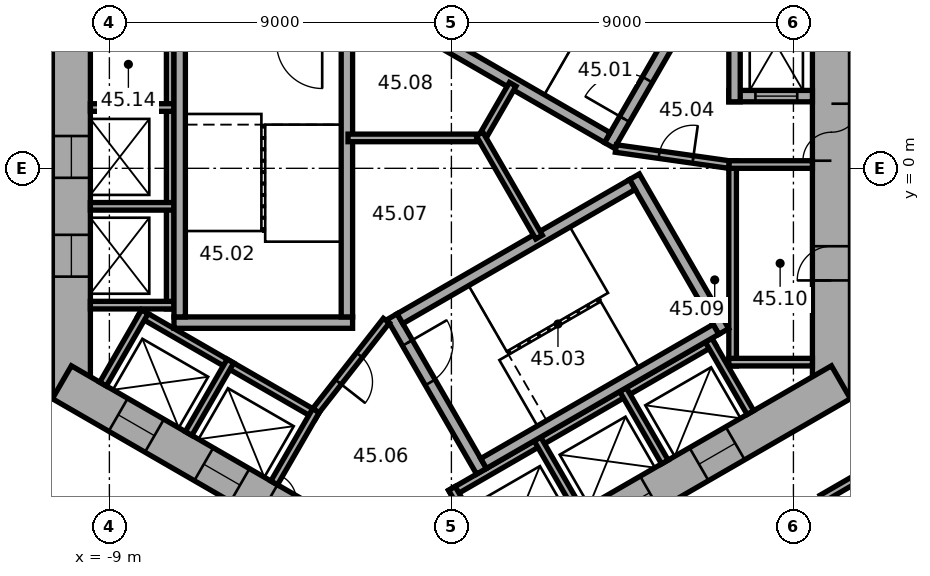
"""IFC4 building model, lengths in metres.
Left out: names, types, materials, properties, quantities, classifications, styles, units other than length and angle.
Written with IfcOpenShell. Run it as: python <this file> out.ifc"""

import sys

from ifc_helpers import new_model, si_unit, direction, frame, frame_2d, origin, place, context, subcontext, project, spatial, rectangle, extrude, element, fill, save


model = new_model("IFC4")
c1 = context("Model", 3, precision=1e-05, world=origin(), true_north=direction((0.0, 1.0)))
c2 = subcontext(c1, "Body", "Model", "MODEL_VIEW")
j1 = project(units=[si_unit("LENGTHUNIT", "METRE"), si_unit("PLANEANGLEUNIT", "RADIAN")], contexts=[c1])
p1 = place(None, origin())
s1 = spatial("IfcSite", under=j1, at=p1, CompositionType="ELEMENT")
p2 = place(p1, origin())
s2 = spatial("IfcBuilding", under=s1, at=p2, CompositionType="ELEMENT")
p3 = place(p2, frame((0.0, 0.0, 183.6)))
s3 = spatial("IfcBuildingStorey", under=s2, at=p3, CompositionType="ELEMENT", Elevation=183.6)
p4 = place(p3, frame((10.0, -6.062, 0.0), z_axis=(0.0, 0.0, 1.0), x_axis=(0.0, 1.0, 0.0)))
e1 = element("IfcWall", 1, at=p4, inside=s3, PredefinedType="SHEAR", context=c2, shape_type="SweptSolid", body=[
    extrude(rectangle(XDim=12.125, YDim=1.0, at=frame_2d((6.062, 0.0))), origin(), (0.0, 0.0, 1.0), 3.7),
])
p5 = place(p4, frame((6.262, 0.0, 0.0)))
e2 = element("IfcOpeningElement", 2, at=p5, cuts=e1, PredefinedType="OPENING", context=c2, shape_type="SweptSolid", body=[
    extrude(rectangle(XDim=1.5, YDim=2.1, at=frame_2d((0.75, 1.05))), frame((0.0, 0.51, 0.0), z_axis=(0.0, -1.0, 0.0), x_axis=(1.0, 0.0, 0.0)), (0.0, 0.0, 1.0), 1.02),
])
p6 = place(p4, frame((3.112, 0.0, 0.0)))
e3 = element("IfcOpeningElement", 3, at=p6, cuts=e1, PredefinedType="OPENING", context=c2, shape_type="SweptSolid", body=[
    extrude(rectangle(XDim=0.9, YDim=2.1, at=frame_2d((0.45, 1.05))), frame((0.0, 0.51, 0.0), z_axis=(0.0, -1.0, 0.0), x_axis=(1.0, 0.0, 0.0)), (0.0, 0.0, 1.0), 1.02),
])
p7 = place(p3, frame((-10.0, 6.062, 0.0), z_axis=(0.0, 0.0, 1.0), x_axis=(0.0, -1.0, 0.0)))
e4 = element("IfcWall", 4, at=p7, inside=s3, PredefinedType="SHEAR", context=c2, shape_type="SweptSolid", body=[
    extrude(rectangle(XDim=12.125, YDim=1.0, at=frame_2d((6.062, 0.0))), origin(), (0.0, 0.0, 1.0), 3.7),
])
p8 = place(p7, frame((5.212, 0.0, 0.0)))
e5 = element("IfcOpeningElement", 5, at=p8, cuts=e4, PredefinedType="OPENING", context=c2, shape_type="SweptSolid", body=[
    extrude(rectangle(XDim=1.1, YDim=2.1, at=frame_2d((0.55, 1.05))), frame((0.0, 0.51, 0.0), z_axis=(0.0, -1.0, 0.0), x_axis=(1.0, 0.0, 0.0)), (0.0, 0.0, 1.0), 1.02),
])
p9 = place(p7, frame((7.812, 0.0, 0.0)))
e6 = element("IfcOpeningElement", 6, at=p9, cuts=e4, PredefinedType="OPENING", context=c2, shape_type="SweptSolid", body=[
    extrude(rectangle(XDim=1.1, YDim=2.1, at=frame_2d((0.55, 1.05))), frame((0.0, 0.51, 0.0), z_axis=(0.0, -1.0, 0.0), x_axis=(1.0, 0.0, 0.0)), (0.0, 0.0, 1.0), 1.02),
])
p10 = place(p3, frame((-10.25, -5.629, 0.0), z_axis=(0.0, 0.0, 1.0), x_axis=(0.866022616891, -0.50000482701, 0.0)))
e7 = element("IfcWall", 7, at=p10, inside=s3, PredefinedType="SHEAR", context=c2, shape_type="SweptSolid", body=[
    extrude(rectangle(XDim=12.125, YDim=1.0, at=frame_2d((6.062, 0.0))), origin(), (0.0, 0.0, 1.0), 3.7),
])
p11 = place(p10, frame((6.262, 0.0, 0.0)))
e8 = element("IfcOpeningElement", 8, at=p11, cuts=e7, PredefinedType="OPENING", context=c2, shape_type="SweptSolid", body=[
    extrude(rectangle(XDim=1.5, YDim=2.1, at=frame_2d((0.75, 1.05))), frame((0.0, 0.51, 0.0), z_axis=(0.0, -1.0, 0.0), x_axis=(1.0, 0.0, 0.0)), (0.0, 0.0, 1.0), 1.02),
])
p12 = place(p10, frame((1.712, 0.0, 0.0)))
e9 = element("IfcOpeningElement", 9, at=p12, cuts=e7, PredefinedType="OPENING", context=c2, shape_type="SweptSolid", body=[
    extrude(rectangle(XDim=1.1, YDim=2.1, at=frame_2d((0.55, 1.05))), frame((0.0, 0.51, 0.0), z_axis=(0.0, -1.0, 0.0), x_axis=(1.0, 0.0, 0.0)), (0.0, 0.0, 1.0), 1.02),
])
p13 = place(p10, frame((4.312, 0.0, 0.0)))
e10 = element("IfcOpeningElement", 10, at=p13, cuts=e7, PredefinedType="OPENING", context=c2, shape_type="SweptSolid", body=[
    extrude(rectangle(XDim=1.1, YDim=2.1, at=frame_2d((0.55, 1.05))), frame((0.0, 0.51, 0.0), z_axis=(0.0, -1.0, 0.0), x_axis=(1.0, 0.0, 0.0)), (0.0, 0.0, 1.0), 1.02),
])
p14 = place(p3, frame((-0.25, -11.691, 0.0), z_axis=(0.0, 0.0, 1.0), x_axis=(0.866022616891, 0.50000482701, 0.0)))
e11 = element("IfcWall", 11, at=p14, inside=s3, PredefinedType="SHEAR", context=c2, shape_type="SweptSolid", body=[
    extrude(rectangle(XDim=12.125, YDim=1.0, at=frame_2d((6.062, 0.0))), origin(), (0.0, 0.0, 1.0), 3.7),
])
p15 = place(p14, frame((2.612, 0.0, 0.0)))
e12 = element("IfcOpeningElement", 12, at=p15, cuts=e11, PredefinedType="OPENING", context=c2, shape_type="SweptSolid", body=[
    extrude(rectangle(XDim=1.1, YDim=2.1, at=frame_2d((0.55, 1.05))), frame((0.0, 0.51, 0.0), z_axis=(0.0, -1.0, 0.0), x_axis=(1.0, 0.0, 0.0)), (0.0, 0.0, 1.0), 1.02),
])
p16 = place(p14, frame((5.212, 0.0, 0.0)))
e13 = element("IfcOpeningElement", 13, at=p16, cuts=e11, PredefinedType="OPENING", context=c2, shape_type="SweptSolid", body=[
    extrude(rectangle(XDim=1.1, YDim=2.1, at=frame_2d((0.55, 1.05))), frame((0.0, 0.51, 0.0), z_axis=(0.0, -1.0, 0.0), x_axis=(1.0, 0.0, 0.0)), (0.0, 0.0, 1.0), 1.02),
])
p17 = place(p14, frame((7.812, 0.0, 0.0)))
e14 = element("IfcOpeningElement", 14, at=p17, cuts=e11, PredefinedType="OPENING", context=c2, shape_type="SweptSolid", body=[
    extrude(rectangle(XDim=1.1, YDim=2.1, at=frame_2d((0.55, 1.05))), frame((0.0, 0.51, 0.0), z_axis=(0.0, -1.0, 0.0), x_axis=(1.0, 0.0, 0.0)), (0.0, 0.0, 1.0), 1.02),
])
p18 = place(p3, frame((7.4, -5.2, 0.0), z_axis=(0.0, 0.0, 1.0), x_axis=(0.0, 1.0, 0.0)))
e15 = element("IfcWall", 15, at=p18, inside=s3, PredefinedType="PARTITIONING", context=c2, shape_type="SweptSolid", body=[
    extrude(rectangle(XDim=5.4, YDim=0.2, at=frame_2d((2.7, 0.0))), origin(), (0.0, 0.0, 1.0), 3.42),
])
for number, where, z_axis, x_axis in (
    (16, (7.3, -5.1, 0.0), (0.0, 0.0, 1.0), (1.0, 0.0, 0.0)),
    (17, (7.3, 0.1, 0.0), (0.0, 0.0, 1.0), (1.0, 0.0, 0.0)),
):
    element("IfcWall", number, at=place(p3, frame(where, z_axis=z_axis, x_axis=x_axis)), inside=s3, PredefinedType="PARTITIONING", context=c2, shape_type="SweptSolid", body=[
        extrude(rectangle(XDim=2.2, YDim=0.2, at=frame_2d((1.1, 0.0))), origin(), (0.0, 0.0, 1.0), 3.42),
    ])
p19 = place(p3, frame((-7.4, 4.3, 0.0), z_axis=(0.0, 0.0, 1.0), x_axis=(0.0, -1.0, 0.0)))
e18 = element("IfcWall", 18, at=p19, inside=s3, PredefinedType="PARTITIONING", context=c2, shape_type="SweptSolid", body=[
    extrude(rectangle(XDim=8.0, YDim=0.2, at=frame_2d((4.0, 0.0))), origin(), (0.0, 0.0, 1.0), 3.42),
])
for number, where, z_axis, x_axis in (
    (19, (-7.3, 1.6, 0.0), (0.0, 0.0, 1.0), (-1.0, 0.0, 0.0)),
    (20, (-7.3, -1.0, 0.0), (0.0, 0.0, 1.0), (-1.0, 0.0, 0.0)),
    (21, (-7.3, -3.6, 0.0), (0.0, 0.0, 1.0), (-1.0, 0.0, 0.0)),
):
    element("IfcWall", number, at=place(p3, frame(where, z_axis=z_axis, x_axis=x_axis)), inside=s3, PredefinedType="PARTITIONING", context=c2, shape_type="SweptSolid", body=[
        extrude(rectangle(XDim=2.2, YDim=0.2, at=frame_2d((1.1, 0.0))), origin(), (0.0, 0.0, 1.0), 3.42),
    ])
p20 = place(p3, frame((-8.203, -3.809, 0.0), z_axis=(0.0, 0.0, 1.0), x_axis=(0.866028230842, -0.499995103361, 0.0)))
e22 = element("IfcWall", 22, at=p20, inside=s3, PredefinedType="PARTITIONING", context=c2, shape_type="SweptSolid", body=[
    extrude(rectangle(XDim=5.4, YDim=0.2, at=frame_2d((2.7, 0.0))), origin(), (0.0, 0.0, 1.0), 3.42),
])
for number, where, z_axis, x_axis in (
    (23, (-8.067, -3.772, 0.0), (0.0, 0.0, 1.0), (-0.5, -0.866, 0.0)),
    (24, (-5.815, -5.072, 0.0), (0.0, 0.0, 1.0), (-0.5, -0.866, 0.0)),
):
    element("IfcWall", number, at=place(p3, frame(where, z_axis=z_axis, x_axis=x_axis)), inside=s3, PredefinedType="PARTITIONING", context=c2, shape_type="SweptSolid", body=[
        extrude(rectangle(XDim=2.2, YDim=0.2, at=frame_2d((1.1, 0.0))), origin(), (0.0, 0.0, 1.0), 3.42),
    ])
p21 = place(p3, frame((-3.563, -6.372, 0.0), z_axis=(0.0, 0.0, 1.0), x_axis=(-0.499994660107, -0.866028486751, 0.0)))
e25 = element("IfcWall", 25, at=p21, inside=s3, PredefinedType="PARTITIONING", context=c2, shape_type="SweptSolid", body=[
    extrude(rectangle(XDim=2.2, YDim=0.2, at=frame_2d((1.1, 0.0))), origin(), (0.0, 0.0, 1.0), 3.42),
])
p22 = place(p3, frame((-0.024, -8.559, 0.0), z_axis=(0.0, 0.0, 1.0), x_axis=(0.866026010844, 0.49999894854, 0.0)))
e26 = element("IfcWall", 26, at=p22, inside=s3, PredefinedType="PARTITIONING", context=c2, shape_type="SweptSolid", body=[
    extrude(rectangle(XDim=8.0, YDim=0.2, at=frame_2d((4.0, 0.0))), origin(), (0.0, 0.0, 1.0), 3.42),
])
for number, where, z_axis, x_axis in (
    (27, (0.013, -8.422, 0.0), (0.0, 0.0, 1.0), (0.5, -0.866, 0.0)),
    (28, (2.264, -7.122, 0.0), (0.0, 0.0, 1.0), (0.5, -0.866, 0.0)),
    (29, (4.516, -5.822, 0.0), (0.0, 0.0, 1.0), (0.5, -0.866, 0.0)),
    (30, (6.768, -4.522, 0.0), (0.0, 0.0, 1.0), (0.5, -0.866, 0.0)),
):
    element("IfcWall", number, at=place(p3, frame(where, z_axis=z_axis, x_axis=x_axis)), inside=s3, PredefinedType="PARTITIONING", context=c2, shape_type="SweptSolid", body=[
        extrude(rectangle(XDim=2.2, YDim=0.2, at=frame_2d((1.1, 0.0))), origin(), (0.0, 0.0, 1.0), 3.42),
    ])
p23 = place(p3, frame((4.158, 0.602, 0.0), z_axis=(0.0, 0.0, 1.0), x_axis=(0.499977259774, 0.866038532462, 0.0)))
e31 = element("IfcWall", 31, at=p23, inside=s3, PredefinedType="SHEAR", context=c2, shape_type="SweptSolid", body=[
    extrude(rectangle(XDim=4.7, YDim=0.3, at=frame_2d((2.35, 0.0))), origin(), (0.0, 0.0, 1.0), 3.42),
])
p24 = place(p23, frame((0.8, 0.0, 0.0)))
e32 = element("IfcOpeningElement", 32, at=p24, cuts=e31, PredefinedType="OPENING", context=c2, shape_type="SweptSolid", body=[
    extrude(rectangle(XDim=1.2, YDim=2.1, at=frame_2d((0.6, 1.05))), frame((0.0, 0.16, 0.0), z_axis=(0.0, -1.0, 0.0), x_axis=(1.0, 0.0, 0.0)), (0.0, 0.0, 1.0), 0.32),
])
p25 = place(p3, frame((4.103, 0.807, 0.0), z_axis=(0.0, 0.0, 1.0), x_axis=(-0.866027801685, 0.499995846692, 0.0)))
e33 = element("IfcWall", 33, at=p25, inside=s3, PredefinedType="SHEAR", context=c2, shape_type="SweptSolid", body=[
    extrude(rectangle(XDim=7.06, YDim=0.3, at=frame_2d((3.53, 0.0))), origin(), (0.0, 0.0, 1.0), 3.42),
])
p26 = place(p3, frame((-2.6, -4.06, 0.0), z_axis=(0.0, 0.0, 1.0), x_axis=(-1.0, 0.0, 0.0)))
e34 = element("IfcWall", 34, at=p26, inside=s3, PredefinedType="SHEAR", context=c2, shape_type="SweptSolid", body=[
    extrude(rectangle(XDim=4.7, YDim=0.3, at=frame_2d((2.35, 0.0))), origin(), (0.0, 0.0, 1.0), 3.42),
])
for number, where, z_axis, x_axis in (
    (35, (-2.75, 3.15, 0.0), (0.0, 0.0, 1.0), (0.0, -1.0, 0.0)),
    (36, (-7.15, 3.15, 0.0), (0.0, 0.0, 1.0), (0.0, -1.0, 0.0)),
):
    element("IfcWall", number, at=place(p3, frame(where, z_axis=z_axis, x_axis=x_axis)), inside=s3, PredefinedType="SHEAR", context=c2, shape_type="SweptSolid", body=[
        extrude(rectangle(XDim=7.06, YDim=0.3, at=frame_2d((3.53, 0.0))), origin(), (0.0, 0.0, 1.0), 3.42),
    ])
p27 = place(p3, frame((-1.558, -3.902, 0.0), z_axis=(0.0, 0.0, 1.0), x_axis=(0.499977259774, -0.866038532462, 0.0)))
e37 = element("IfcWall", 37, at=p27, inside=s3, PredefinedType="SHEAR", context=c2, shape_type="SweptSolid", body=[
    extrude(rectangle(XDim=4.7, YDim=0.3, at=frame_2d((2.35, 0.0))), origin(), (0.0, 0.0, 1.0), 3.42),
])
p28 = place(p27, frame((0.8, 0.0, 0.0)))
e38 = element("IfcOpeningElement", 38, at=p28, cuts=e37, PredefinedType="OPENING", context=c2, shape_type="SweptSolid", body=[
    extrude(rectangle(XDim=1.2, YDim=2.1, at=frame_2d((0.6, 1.05))), frame((0.0, 0.16, 0.0), z_axis=(0.0, -1.0, 0.0), x_axis=(1.0, 0.0, 0.0)), (0.0, 0.0, 1.0), 0.32),
])
p29 = place(p3, frame((4.816, -0.222, 0.0), z_axis=(0.0, 0.0, 1.0), x_axis=(0.499977259774, -0.866038532462, 0.0)))
e39 = element("IfcWall", 39, at=p29, inside=s3, PredefinedType="SHEAR", context=c2, shape_type="SweptSolid", body=[
    extrude(rectangle(XDim=4.7, YDim=0.3, at=frame_2d((2.35, 0.0))), origin(), (0.0, 0.0, 1.0), 3.42),
])
for number, where, z_axis, x_axis in (
    (40, (-1.353, -3.957, 0.0), (0.0, 0.0, 1.0), (0.866, 0.5, 0.0)),
    (41, (0.847, -7.767, 0.0), (0.0, 0.0, 1.0), (0.866, 0.5, 0.0)),
):
    element("IfcWall", number, at=place(p3, frame(where, z_axis=z_axis, x_axis=x_axis)), inside=s3, PredefinedType="SHEAR", context=c2, shape_type="SweptSolid", body=[
        extrude(rectangle(XDim=7.06, YDim=0.3, at=frame_2d((3.53, 0.0))), origin(), (0.0, 0.0, 1.0), 3.42),
    ])
p30 = place(p3, frame((7.3, 1.9, 0.0), z_axis=(0.0, 0.0, 1.0), x_axis=(1.0, 0.0, 0.0)))
e42 = element("IfcWall", 42, at=p30, inside=s3, PredefinedType="SHEAR", context=c2, shape_type="SweptSolid", body=[
    extrude(rectangle(XDim=2.2, YDim=0.3, at=frame_2d((1.1, 0.0))), origin(), (0.0, 0.0, 1.0), 3.42),
])
p31 = place(p30, frame((0.7, 0.0, 0.0)))
e43 = element("IfcOpeningElement", 43, at=p31, cuts=e42, PredefinedType="OPENING", context=c2, shape_type="SweptSolid", body=[
    extrude(rectangle(XDim=1.1, YDim=2.1, at=frame_2d((0.55, 1.05))), frame((0.0, 0.16, 0.0), z_axis=(0.0, -1.0, 0.0), x_axis=(1.0, 0.0, 0.0)), (0.0, 0.0, 1.0), 0.32),
])
p32 = place(p3, frame((7.45, 1.75, 0.0), z_axis=(0.0, 0.0, 1.0), x_axis=(0.0, 1.0, 0.0)))
e44 = element("IfcWall", 44, at=p32, inside=s3, PredefinedType="SHEAR", context=c2, shape_type="SweptSolid", body=[
    extrude(rectangle(XDim=3.35, YDim=0.3, at=frame_2d((1.675, 0.0))), origin(), (0.0, 0.0, 1.0), 3.42),
])
p33 = place(p3, frame((4.327, 0.521, 0.0), z_axis=(0.0, 0.0, 1.0), x_axis=(0.990124376366, -0.14019172346, 0.0)))
e45 = element("IfcWall", 45, at=p33, inside=s3, PredefinedType="PARTITIONING", context=c2, shape_type="SweptSolid", body=[
    extrude(rectangle(XDim=3.002, YDim=0.2, at=frame_2d((1.501, 0.0))), origin(), (0.0, 0.0, 1.0), 3.42),
])
p34 = place(p33, frame((1.15, 0.0, 0.0)))
e46 = element("IfcOpeningElement", 46, at=p34, cuts=e45, PredefinedType="OPENING", context=c2, shape_type="SweptSolid", body=[
    extrude(rectangle(XDim=0.9, YDim=2.1, at=frame_2d((0.45, 1.05))), frame((0.0, 0.11, 0.0), z_axis=(0.0, -1.0, 0.0), x_axis=(1.0, 0.0, 0.0)), (0.0, 0.0, 1.0), 0.22),
])
p35 = place(p3, frame((-1.712, -4.008, 0.0), z_axis=(0.0, 0.0, 1.0), x_axis=(-0.616549420702, -0.787316208287, 0.0)))
e47 = element("IfcWall", 47, at=p35, inside=s3, PredefinedType="PARTITIONING", context=c2, shape_type="SweptSolid", body=[
    extrude(rectangle(XDim=3.002, YDim=0.2, at=frame_2d((1.501, 0.0))), origin(), (0.0, 0.0, 1.0), 3.42),
])
p36 = place(p35, frame((1.15, 0.0, 0.0)))
e48 = element("IfcOpeningElement", 48, at=p36, cuts=e47, PredefinedType="OPENING", context=c2, shape_type="SweptSolid", body=[
    extrude(rectangle(XDim=0.9, YDim=2.1, at=frame_2d((0.45, 1.05))), frame((0.0, 0.11, 0.0), z_axis=(0.0, -1.0, 0.0), x_axis=(1.0, 0.0, 0.0)), (0.0, 0.0, 1.0), 0.22),
])
p37 = place(p3, frame((0.92, 0.8, 0.0), z_axis=(0.0, 0.0, 1.0), x_axis=(-1.0, 0.0, 0.0)))
e49 = element("IfcWall", 49, at=p37, inside=s3, PredefinedType="PARTITIONING", context=c2, shape_type="SweptSolid", body=[
    extrude(rectangle(XDim=3.64, YDim=0.2, at=frame_2d((1.82, 0.0))), origin(), (0.0, 0.0, 1.0), 3.42),
])
p38 = place(p3, frame((0.74, 0.696, 0.0), z_axis=(0.0, 0.0, 1.0), x_axis=(0.499956301907, 0.86605063142, 0.0)))
e50 = element("IfcWall", 50, at=p38, inside=s3, PredefinedType="PARTITIONING", context=c2, shape_type="SweptSolid", body=[
    extrude(rectangle(XDim=1.747, YDim=0.2, at=frame_2d((0.874, 0.0))), origin(), (0.0, 0.0, 1.0), 3.42),
])
p39 = place(p3, frame((0.74, 0.904, 0.0), z_axis=(0.0, 0.0, 1.0), x_axis=(0.500028278809, -0.866009076391, 0.0)))
e51 = element("IfcWall", 51, at=p39, inside=s3, PredefinedType="PARTITIONING", context=c2, shape_type="SweptSolid", body=[
    extrude(rectangle(XDim=3.133, YDim=0.2, at=frame_2d((1.566, 0.0))), origin(), (0.0, 0.0, 1.0), 3.42),
])
p40 = place(p3, frame((9.752, -8.688, 0.0), z_axis=(0.0, 0.0, 1.0), x_axis=(0.865974105138, 0.500088841337, 0.0)))
e52 = element("IfcWall", 52, at=p40, inside=s3, PredefinedType="PARTITIONING", context=c2, shape_type="SweptSolid", body=[
    extrude(rectangle(XDim=1.961, YDim=0.2, at=frame_2d((0.98, 0.0))), origin(), (0.0, 0.0, 1.0), 3.42),
])
p41 = place(p5, origin())
e53 = element("IfcDoor", 53, at=p41, inside=s3, OperationType="DOUBLE_DOOR_SINGLE_SWING", PredefinedType="DOOR", context=c2, shape_type="SweptSolid", body=[
    extrude(rectangle(XDim=1.5, YDim=2.1, at=frame_2d((0.75, 1.05))), frame((0.0, 0.025, 0.0), z_axis=(0.0, -1.0, 0.0), x_axis=(1.0, 0.0, 0.0)), (0.0, 0.0, 1.0), 0.05),
])
fill(e2, e53)
p42 = place(p24, origin())
e54 = element("IfcDoor", 54, at=p42, inside=s3, OperationType="SINGLE_SWING_RIGHT", PredefinedType="DOOR", context=c2, shape_type="SweptSolid", body=[
    extrude(rectangle(XDim=1.2, YDim=2.1, at=frame_2d((0.6, 1.05))), frame((0.0, 0.025, 0.0), z_axis=(0.0, -1.0, 0.0), x_axis=(1.0, 0.0, 0.0)), (0.0, 0.0, 1.0), 0.05),
])
fill(e32, e54)
p43 = place(p28, origin())
e55 = element("IfcDoor", 55, at=p43, inside=s3, OperationType="SINGLE_SWING_RIGHT", PredefinedType="DOOR", context=c2, shape_type="SweptSolid", body=[
    extrude(rectangle(XDim=1.2, YDim=2.1, at=frame_2d((0.6, 1.05))), frame((0.0, 0.025, 0.0), z_axis=(0.0, -1.0, 0.0), x_axis=(1.0, 0.0, 0.0)), (0.0, 0.0, 1.0), 0.05),
])
fill(e38, e55)
p44 = place(p34, origin())
e56 = element("IfcDoor", 56, at=p44, inside=s3, OperationType="SINGLE_SWING_LEFT", PredefinedType="DOOR", context=c2, shape_type="SweptSolid", body=[
    extrude(rectangle(XDim=0.9, YDim=2.1, at=frame_2d((0.45, 1.05))), frame((0.0, 0.025, 0.0), z_axis=(0.0, -1.0, 0.0), x_axis=(1.0, 0.0, 0.0)), (0.0, 0.0, 1.0), 0.05),
])
fill(e46, e56)
p45 = place(p36, origin())
e57 = element("IfcDoor", 57, at=p45, inside=s3, OperationType="SINGLE_SWING_LEFT", PredefinedType="DOOR", context=c2, shape_type="SweptSolid", body=[
    extrude(rectangle(XDim=0.9, YDim=2.1, at=frame_2d((0.45, 1.05))), frame((0.0, 0.025, 0.0), z_axis=(0.0, -1.0, 0.0), x_axis=(1.0, 0.0, 0.0)), (0.0, 0.0, 1.0), 0.05),
])
fill(e48, e57)
p46 = place(p6, origin())
e58 = element("IfcDoor", 58, at=p46, inside=s3, OperationType="SINGLE_SWING_LEFT", PredefinedType="DOOR", context=c2, shape_type="SweptSolid", body=[
    extrude(rectangle(XDim=0.9, YDim=2.1, at=frame_2d((0.45, 1.05))), frame((0.0, 0.025, 0.0), z_axis=(0.0, -1.0, 0.0), x_axis=(1.0, 0.0, 0.0)), (0.0, 0.0, 1.0), 0.05),
])
fill(e3, e58)
p47 = place(p31, origin())
e59 = element("IfcDoor", 59, at=p47, inside=s3, OperationType="DOUBLE_DOOR_SLIDING", PredefinedType="DOOR", context=c2, shape_type="SweptSolid", body=[
    extrude(rectangle(XDim=1.1, YDim=2.1, at=frame_2d((0.55, 1.05))), frame((0.0, 0.025, 0.0), z_axis=(0.0, -1.0, 0.0), x_axis=(1.0, 0.0, 0.0)), (0.0, 0.0, 1.0), 0.05),
])
fill(e43, e59)
p48 = place(p8, origin())
e60 = element("IfcDoor", 60, at=p48, inside=s3, OperationType="DOUBLE_DOOR_SLIDING", PredefinedType="DOOR", context=c2, shape_type="SweptSolid", body=[
    extrude(rectangle(XDim=1.1, YDim=2.1, at=frame_2d((0.55, 1.05))), frame((0.0, 0.025, 0.0), z_axis=(0.0, -1.0, 0.0), x_axis=(1.0, 0.0, 0.0)), (0.0, 0.0, 1.0), 0.05),
])
fill(e5, e60)
p49 = place(p9, origin())
e61 = element("IfcDoor", 61, at=p49, inside=s3, OperationType="DOUBLE_DOOR_SLIDING", PredefinedType="DOOR", context=c2, shape_type="SweptSolid", body=[
    extrude(rectangle(XDim=1.1, YDim=2.1, at=frame_2d((0.55, 1.05))), frame((0.0, 0.025, 0.0), z_axis=(0.0, -1.0, 0.0), x_axis=(1.0, 0.0, 0.0)), (0.0, 0.0, 1.0), 0.05),
])
fill(e6, e61)
p50 = place(p12, origin())
e62 = element("IfcDoor", 62, at=p50, inside=s3, OperationType="DOUBLE_DOOR_SLIDING", PredefinedType="DOOR", context=c2, shape_type="SweptSolid", body=[
    extrude(rectangle(XDim=1.1, YDim=2.1, at=frame_2d((0.55, 1.05))), frame((0.0, 0.025, 0.0), z_axis=(0.0, -1.0, 0.0), x_axis=(1.0, 0.0, 0.0)), (0.0, 0.0, 1.0), 0.05),
])
fill(e9, e62)
p51 = place(p13, origin())
e63 = element("IfcDoor", 63, at=p51, inside=s3, OperationType="DOUBLE_DOOR_SLIDING", PredefinedType="DOOR", context=c2, shape_type="SweptSolid", body=[
    extrude(rectangle(XDim=1.1, YDim=2.1, at=frame_2d((0.55, 1.05))), frame((0.0, 0.025, 0.0), z_axis=(0.0, -1.0, 0.0), x_axis=(1.0, 0.0, 0.0)), (0.0, 0.0, 1.0), 0.05),
])
fill(e10, e63)
p52 = place(p16, origin())
e64 = element("IfcDoor", 64, at=p52, inside=s3, OperationType="DOUBLE_DOOR_SLIDING", PredefinedType="DOOR", context=c2, shape_type="SweptSolid", body=[
    extrude(rectangle(XDim=1.1, YDim=2.1, at=frame_2d((0.55, 1.05))), frame((0.0, 0.025, 0.0), z_axis=(0.0, -1.0, 0.0), x_axis=(1.0, 0.0, 0.0)), (0.0, 0.0, 1.0), 0.05),
])
fill(e13, e64)
p53 = place(p17, origin())
e65 = element("IfcDoor", 65, at=p53, inside=s3, OperationType="DOUBLE_DOOR_SLIDING", PredefinedType="DOOR", context=c2, shape_type="SweptSolid", body=[
    extrude(rectangle(XDim=1.1, YDim=2.1, at=frame_2d((0.55, 1.05))), frame((0.0, 0.025, 0.0), z_axis=(0.0, -1.0, 0.0), x_axis=(1.0, 0.0, 0.0)), (0.0, 0.0, 1.0), 0.05),
])
fill(e14, e65)
save(model, sys.argv[1])
